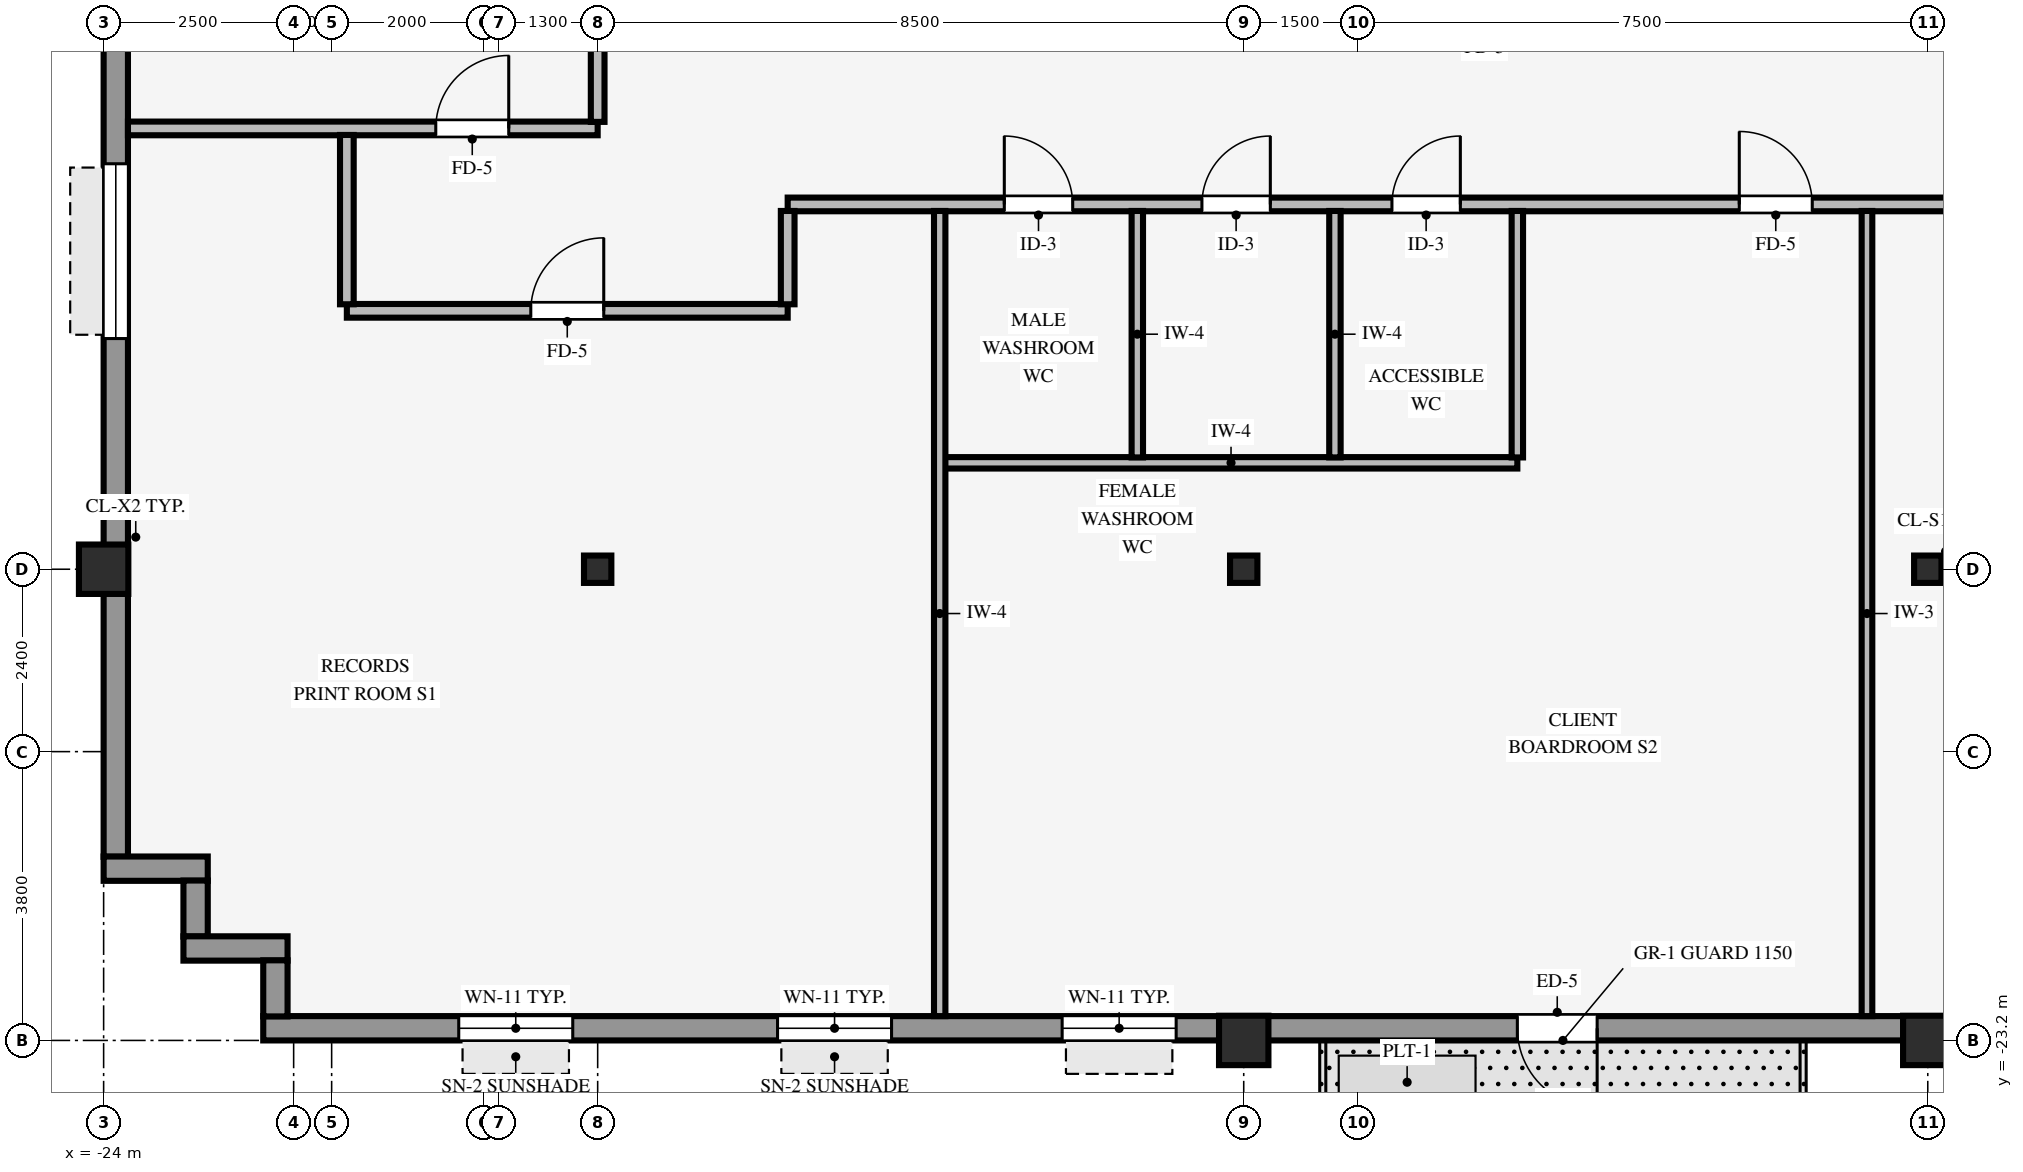
"""IFC4 building model, lengths in metres.
Left out: names, types, materials, properties, quantities, classifications, styles, units other than length and angle.
Written with IfcOpenShell. Run it as: python <this file> out.ifc"""

import sys

from ifc_helpers import new_model, si_unit, direction, frame, frame_2d, origin, origin_2d, place, context, subcontext, project, spatial, rectangle, hollow_rectangle, i_section, extrude, source, transform, mapped, element, fill, save


model = new_model("IFC4")
c1 = context("Model", 3, precision=1e-05, world=origin(), true_north=direction((0.0, 1.0)))
c2 = subcontext(c1, "Body", "Model", "MODEL_VIEW")
j1 = project(units=[si_unit("LENGTHUNIT", "METRE"), si_unit("PLANEANGLEUNIT", "RADIAN")], contexts=[c1])
p1 = place(None, origin())
s1 = spatial("IfcSite", under=j1, at=p1, CompositionType="ELEMENT")
p2 = place(p1, origin())
s2 = spatial("IfcBuilding", under=s1, at=p2, CompositionType="ELEMENT")
p3 = place(p2, frame((0.0, 0.0, 109.25)))
s3 = spatial("IfcBuildingStorey", under=s2, at=p3, CompositionType="ELEMENT", Elevation=109.25)
for number, where, z_axis, x_axis in (
    (1, (-24.0, -17.0, 0.0), (0.0, 0.0, 1.0), (1.0, 0.0, 0.0)),
    (2, (-9.0, -23.2, 0.0), (0.0, 0.0, 1.0), (1.0, 0.0, 0.0)),
    (3, (0.0, -23.2, 0.0), (0.0, 0.0, 1.0), (1.0, 0.0, 0.0)),
):
    element("IfcColumn", number, at=place(p3, frame(where, z_axis=z_axis, x_axis=x_axis)), inside=s3, PredefinedType="COLUMN", context=c2, shape_type="SweptSolid", body=[
        extrude(hollow_rectangle(XDim=0.65, YDim=0.65, WallThickness=0.04, InnerFilletRadius=0.04, OuterFilletRadius=0.08, at=origin_2d()), origin(), (0.0, 0.0, 1.0), 3.37),
    ])
for number, where, z_axis, x_axis in (
    (4, (0.0, -17.0, 0.0), (0.0, 0.0, 1.0), (1.0, 0.0, 0.0)),
    (5, (-17.5, -17.0, 0.0), (0.0, 0.0, 1.0), (1.0, 0.0, 0.0)),
    (6, (-9.0, -17.0, 0.0), (0.0, 0.0, 1.0), (1.0, 0.0, 0.0)),
):
    element("IfcColumn", number, at=place(p3, frame(where, z_axis=z_axis, x_axis=x_axis)), inside=s3, PredefinedType="COLUMN", context=c2, shape_type="SweptSolid", body=[
        extrude(i_section(OverallWidth=0.36, OverallDepth=0.36, WebThickness=0.021, FlangeThickness=0.021, FilletRadius=0.018, at=origin_2d()), origin(), (0.0, 0.0, 1.0), 3.37),
    ])
p4 = place(p3, frame((-21.9, -23.04, 0.0), z_axis=(0.0, 0.0, 1.0), x_axis=(1.0, 0.0, 0.0)))
e7 = element("IfcWall", 7, at=p4, inside=s3, PredefinedType="STANDARD", context=c2, shape_type="SweptSolid", body=[
    extrude(rectangle(XDim=43.8, YDim=0.32, at=frame_2d((21.9, 0.0))), origin(), (0.0, 0.0, 1.0), 2.705),
])
p5 = place(p4, frame((17.55, 0.0, 0.0), z_axis=(0.0, 0.0, 1.0), x_axis=(-1.0, 0.0, 0.0)))
e8 = element("IfcOpeningElement", 8, at=p5, cuts=e7, PredefinedType="OPENING", context=c2, shape_type="SweptSolid", body=[
    extrude(rectangle(XDim=1.05, YDim=2.1, at=frame_2d((0.525, 1.05))), frame((0.0, 0.17, 0.0), z_axis=(0.0, -1.0, 0.0), x_axis=(1.0, 0.0, 0.0)), (0.0, 0.0, 1.0), 0.34),
])
p6 = place(p4, frame((2.572, 0.0, 0.8)))
e9 = element("IfcOpeningElement", 9, at=p6, cuts=e7, PredefinedType="OPENING", context=c2, shape_type="SweptSolid", body=[
    extrude(rectangle(XDim=1.5, YDim=1.6, at=frame_2d((0.75, 0.8))), frame((0.0, 0.17, 0.0), z_axis=(0.0, -1.0, 0.0), x_axis=(1.0, 0.0, 0.0)), (0.0, 0.0, 1.0), 0.34),
])
p7 = place(p4, frame((6.767, 0.0, 0.8)))
e10 = element("IfcOpeningElement", 10, at=p7, cuts=e7, PredefinedType="OPENING", context=c2, shape_type="SweptSolid", body=[
    extrude(rectangle(XDim=1.5, YDim=1.6, at=frame_2d((0.75, 0.8))), frame((0.0, 0.17, 0.0), z_axis=(0.0, -1.0, 0.0), x_axis=(1.0, 0.0, 0.0)), (0.0, 0.0, 1.0), 0.34),
])
p8 = place(p4, frame((10.511, 0.0, 0.8)))
e11 = element("IfcOpeningElement", 11, at=p8, cuts=e7, PredefinedType="OPENING", context=c2, shape_type="SweptSolid", body=[
    extrude(rectangle(XDim=1.5, YDim=1.6, at=frame_2d((0.75, 0.8))), frame((0.0, 0.17, 0.0), z_axis=(0.0, -1.0, 0.0), x_axis=(1.0, 0.0, 0.0)), (0.0, 0.0, 1.0), 0.34),
])
p9 = place(p4, frame((25.794, 0.0, 0.8)))
e12 = element("IfcOpeningElement", 12, at=p9, cuts=e7, PredefinedType="OPENING", context=c2, shape_type="SweptSolid", body=[
    extrude(rectangle(XDim=1.5, YDim=1.6, at=frame_2d((0.75, 0.8))), frame((0.0, 0.17, 0.0), z_axis=(0.0, -1.0, 0.0), x_axis=(1.0, 0.0, 0.0)), (0.0, 0.0, 1.0), 0.34),
])
p10 = place(p4, frame((31.789, 0.0, 0.8)))
e13 = element("IfcOpeningElement", 13, at=p10, cuts=e7, PredefinedType="OPENING", context=c2, shape_type="SweptSolid", body=[
    extrude(rectangle(XDim=1.5, YDim=1.6, at=frame_2d((0.75, 0.8))), frame((0.0, 0.17, 0.0), z_axis=(0.0, -1.0, 0.0), x_axis=(1.0, 0.0, 0.0)), (0.0, 0.0, 1.0), 0.34),
])
p11 = place(p4, frame((35.083, 0.0, 0.8)))
e14 = element("IfcOpeningElement", 14, at=p11, cuts=e7, PredefinedType="OPENING", context=c2, shape_type="SweptSolid", body=[
    extrude(rectangle(XDim=1.5, YDim=1.6, at=frame_2d((0.75, 0.8))), frame((0.0, 0.17, 0.0), z_axis=(0.0, -1.0, 0.0), x_axis=(1.0, 0.0, 0.0)), (0.0, 0.0, 1.0), 0.34),
])
p12 = place(p4, frame((39.728, 0.0, 0.8)))
e15 = element("IfcOpeningElement", 15, at=p12, cuts=e7, PredefinedType="OPENING", context=c2, shape_type="SweptSolid", body=[
    extrude(rectangle(XDim=1.5, YDim=1.6, at=frame_2d((0.75, 0.8))), frame((0.0, 0.17, 0.0), z_axis=(0.0, -1.0, 0.0), x_axis=(1.0, 0.0, 0.0)), (0.0, 0.0, 1.0), 0.34),
])
p13 = place(p3, frame((-23.84, -20.784, 0.0), z_axis=(0.0, 0.0, 1.0), x_axis=(0.0, 1.0, 0.0)))
e16 = element("IfcWall", 16, at=p13, inside=s3, PredefinedType="STANDARD", context=c2, shape_type="SweptSolid", body=[
    extrude(rectangle(XDim=41.568, YDim=0.32, at=frame_2d((20.784, 0.0))), origin(), (0.0, 0.0, 1.0), 2.705),
])
p14 = place(p13, frame((6.819, 0.0, 0.8)))
e17 = element("IfcOpeningElement", 17, at=p14, cuts=e16, PredefinedType="OPENING", context=c2, shape_type="SweptSolid", body=[
    extrude(rectangle(XDim=2.3, YDim=1.62, at=frame_2d((1.15, 0.81))), frame((0.0, 0.17, 0.0), z_axis=(0.0, -1.0, 0.0), x_axis=(1.0, 0.0, 0.0)), (0.0, 0.0, 1.0), 0.34),
])
p15 = place(p13, frame((12.215, 0.0, 0.8)))
e18 = element("IfcOpeningElement", 18, at=p15, cuts=e16, PredefinedType="OPENING", context=c2, shape_type="SweptSolid", body=[
    extrude(rectangle(XDim=2.3, YDim=1.62, at=frame_2d((1.15, 0.81))), frame((0.0, 0.17, 0.0), z_axis=(0.0, -1.0, 0.0), x_axis=(1.0, 0.0, 0.0)), (0.0, 0.0, 1.0), 0.34),
])
p16 = place(p13, frame((17.161, 0.0, 0.8)))
e19 = element("IfcOpeningElement", 19, at=p16, cuts=e16, PredefinedType="OPENING", context=c2, shape_type="SweptSolid", body=[
    extrude(rectangle(XDim=2.3, YDim=1.62, at=frame_2d((1.15, 0.81))), frame((0.0, 0.17, 0.0), z_axis=(0.0, -1.0, 0.0), x_axis=(1.0, 0.0, 0.0)), (0.0, 0.0, 1.0), 0.34),
])
p17 = place(p13, frame((27.053, 0.0, 0.8)))
e20 = element("IfcOpeningElement", 20, at=p17, cuts=e16, PredefinedType="OPENING", context=c2, shape_type="SweptSolid", body=[
    extrude(rectangle(XDim=2.3, YDim=1.62, at=frame_2d((1.15, 0.81))), frame((0.0, 0.17, 0.0), z_axis=(0.0, -1.0, 0.0), x_axis=(1.0, 0.0, 0.0)), (0.0, 0.0, 1.0), 0.34),
])
p18 = place(p13, frame((32.449, 0.0, 0.8)))
e21 = element("IfcOpeningElement", 21, at=p18, cuts=e16, PredefinedType="OPENING", context=c2, shape_type="SweptSolid", body=[
    extrude(rectangle(XDim=2.3, YDim=1.62, at=frame_2d((1.15, 0.81))), frame((0.0, 0.17, 0.0), z_axis=(0.0, -1.0, 0.0), x_axis=(1.0, 0.0, 0.0)), (0.0, 0.0, 1.0), 0.34),
])
p19 = place(p3, frame((-24.0, -20.94, 0.0), z_axis=(0.0, 0.0, 1.0), x_axis=(1.0, 0.0, 0.0)))
e22 = element("IfcWall", 22, at=p19, inside=s3, PredefinedType="STANDARD", context=c2, shape_type="SweptSolid", body=[
    extrude(rectangle(XDim=1.37, YDim=0.32, at=frame_2d((0.685, 0.0))), origin(), (0.0, 0.0, 1.0), 3.36),
])
p20 = place(p3, frame((-22.79, -21.834, 0.0), z_axis=(0.0, 0.0, 1.0), x_axis=(0.0, 1.0, 0.0)))
e23 = element("IfcWall", 23, at=p20, inside=s3, PredefinedType="STANDARD", context=c2, shape_type="SweptSolid", body=[
    extrude(rectangle(XDim=0.738, YDim=0.32, at=frame_2d((0.369, 0.0))), origin(), (0.0, 0.0, 1.0), 3.36),
])
p21 = place(p3, frame((-22.95, -21.99, 0.0), z_axis=(0.0, 0.0, 1.0), x_axis=(1.0, 0.0, 0.0)))
e24 = element("IfcWall", 24, at=p21, inside=s3, PredefinedType="STANDARD", context=c2, shape_type="SweptSolid", body=[
    extrude(rectangle(XDim=1.37, YDim=0.32, at=frame_2d((0.685, 0.0))), origin(), (0.0, 0.0, 1.0), 3.36),
])
p22 = place(p3, frame((-21.74, -22.884, 0.0), z_axis=(0.0, 0.0, 1.0), x_axis=(0.0, 1.0, 0.0)))
e25 = element("IfcWall", 25, at=p22, inside=s3, PredefinedType="STANDARD", context=c2, shape_type="SweptSolid", body=[
    extrude(rectangle(XDim=0.738, YDim=0.32, at=frame_2d((0.369, 0.0))), origin(), (0.0, 0.0, 1.0), 3.36),
])
p23 = place(p3, frame((-12.934, -15.6, 0.0), z_axis=(0.0, 0.0, 1.0), x_axis=(1.0, 0.0, 0.0)))
e26 = element("IfcWall", 26, at=p23, inside=s3, PredefinedType="PARTITIONING", context=c2, shape_type="SweptSolid", body=[
    extrude(rectangle(XDim=7.534, YDim=0.15, at=frame_2d((3.767, 0.0))), origin(), (0.0, 0.0, 1.0), 3.36),
])
p24 = place(p3, frame((-20.8, -13.6, 0.0), z_axis=(0.0, 0.0, 1.0), x_axis=(1.0, 0.0, 0.0)))
e27 = element("IfcWall", 27, at=p24, inside=s3, PredefinedType="PARTITIONING", context=c2, shape_type="SweptSolid", body=[
    extrude(rectangle(XDim=5.8, YDim=0.18, at=frame_2d((2.9, 0.0))), origin(), (0.0, 0.0, 1.0), 2.998),
])
p25 = place(p24, frame((2.42, 0.0, 0.0)))
e28 = element("IfcOpeningElement", 28, at=p25, cuts=e27, PredefinedType="OPENING", context=c2, shape_type="SweptSolid", body=[
    extrude(rectangle(XDim=0.96, YDim=2.1, at=frame_2d((0.48, 1.05))), frame((0.0, 0.1, 0.0), z_axis=(0.0, -1.0, 0.0), x_axis=(1.0, 0.0, 0.0)), (0.0, 0.0, 1.0), 0.2),
])
p26 = place(p3, frame((-15.0, -12.2, 0.0), z_axis=(0.0, 0.0, 1.0), x_axis=(1.0, 0.0, 0.0)))
e29 = element("IfcWall", 29, at=p26, inside=s3, PredefinedType="PARTITIONING", context=c2, shape_type="SweptSolid", body=[
    extrude(rectangle(XDim=30.0, YDim=0.18, at=frame_2d((15.0, 0.0))), origin(), (0.0, 0.0, 1.0), 3.36),
])
p27 = place(p26, frame((17.935, 0.0, 0.0)))
e30 = element("IfcOpeningElement", 30, at=p27, cuts=e29, PredefinedType="OPENING", context=c2, shape_type="SweptSolid", body=[
    extrude(rectangle(XDim=0.96, YDim=2.1, at=frame_2d((0.48, 1.05))), frame((0.0, 0.1, 0.0), z_axis=(0.0, -1.0, 0.0), x_axis=(1.0, 0.0, 0.0)), (0.0, 0.0, 1.0), 0.2),
])
p28 = place(p26, frame((25.835, 0.0, 0.0)))
e31 = element("IfcOpeningElement", 31, at=p28, cuts=e29, PredefinedType="OPENING", context=c2, shape_type="SweptSolid", body=[
    extrude(rectangle(XDim=0.96, YDim=2.1, at=frame_2d((0.48, 1.05))), frame((0.0, 0.1, 0.0), z_axis=(0.0, -1.0, 0.0), x_axis=(1.0, 0.0, 0.0)), (0.0, 0.0, 1.0), 0.2),
])
p29 = place(p26, frame((5.45, 0.0, 0.0)))
e32 = element("IfcOpeningElement", 32, at=p29, cuts=e29, PredefinedType="OPENING", context=c2, shape_type="SweptSolid", body=[
    extrude(rectangle(XDim=0.9, YDim=2.1, at=frame_2d((0.45, 1.05))), frame((0.0, 0.1, 0.0), z_axis=(0.0, -1.0, 0.0), x_axis=(1.0, 0.0, 0.0)), (0.0, 0.0, 1.0), 0.2),
])
p30 = place(p26, frame((2.85, 0.0, 0.0)))
e33 = element("IfcOpeningElement", 33, at=p30, cuts=e29, PredefinedType="OPENING", context=c2, shape_type="SweptSolid", body=[
    extrude(rectangle(XDim=0.9, YDim=2.1, at=frame_2d((0.45, 1.05))), frame((0.0, 0.1, 0.0), z_axis=(0.0, -1.0, 0.0), x_axis=(1.0, 0.0, 0.0)), (0.0, 0.0, 1.0), 0.2),
])
p31 = place(p26, frame((12.52, 0.0, 0.0)))
e34 = element("IfcOpeningElement", 34, at=p31, cuts=e29, PredefinedType="OPENING", context=c2, shape_type="SweptSolid", body=[
    extrude(rectangle(XDim=0.96, YDim=2.1, at=frame_2d((0.48, 1.05))), frame((0.0, 0.1, 0.0), z_axis=(0.0, -1.0, 0.0), x_axis=(1.0, 0.0, 0.0)), (0.0, 0.0, 1.0), 0.2),
])
p32 = place(p26, frame((7.95, 0.0, 0.0)))
e35 = element("IfcOpeningElement", 35, at=p32, cuts=e29, PredefinedType="OPENING", context=c2, shape_type="SweptSolid", body=[
    extrude(rectangle(XDim=0.9, YDim=2.1, at=frame_2d((0.45, 1.05))), frame((0.0, 0.1, 0.0), z_axis=(0.0, -1.0, 0.0), x_axis=(1.0, 0.0, 0.0)), (0.0, 0.0, 1.0), 0.2),
])
p33 = place(p3, frame((-23.68, -11.2, 0.0), z_axis=(0.0, 0.0, 1.0), x_axis=(1.0, 0.0, 0.0)))
e36 = element("IfcWall", 36, at=p33, inside=s3, PredefinedType="PARTITIONING", context=c2, shape_type="SweptSolid", body=[
    extrude(rectangle(XDim=6.18, YDim=0.18, at=frame_2d((3.09, 0.0))), origin(), (0.0, 0.0, 1.0), 3.36),
])
p34 = place(p33, frame((4.05, 0.0, 0.0)))
e37 = element("IfcOpeningElement", 37, at=p34, cuts=e36, PredefinedType="OPENING", context=c2, shape_type="SweptSolid", body=[
    extrude(rectangle(XDim=0.96, YDim=2.1, at=frame_2d((0.48, 1.05))), frame((0.0, 0.1, 0.0), z_axis=(0.0, -1.0, 0.0), x_axis=(1.0, 0.0, 0.0)), (0.0, 0.0, 1.0), 0.2),
])
p35 = place(p3, frame((-20.8, -13.514, 0.0), z_axis=(0.0, 0.0, 1.0), x_axis=(0.0, 1.0, 0.0)))
e38 = element("IfcWall", 38, at=p35, inside=s3, PredefinedType="PARTITIONING", context=c2, shape_type="SweptSolid", body=[
    extrude(rectangle(XDim=2.228, YDim=0.18, at=frame_2d((1.114, 0.0))), origin(), (0.0, 0.0, 1.0), 3.36),
])
p36 = place(p3, frame((-17.5, -11.114, 0.0), z_axis=(0.0, 0.0, 1.0), x_axis=(0.0, 1.0, 0.0)))
e39 = element("IfcWall", 39, at=p36, inside=s3, PredefinedType="PARTITIONING", context=c2, shape_type="SweptSolid", body=[
    extrude(rectangle(XDim=0.968, YDim=0.18, at=frame_2d((0.484, 0.0))), origin(), (0.0, 0.0, 1.0), 2.738),
])
p37 = place(p3, frame((-15.0, -13.514, 0.0), z_axis=(0.0, 0.0, 1.0), x_axis=(0.0, 1.0, 0.0)))
e40 = element("IfcWall", 40, at=p37, inside=s3, PredefinedType="PARTITIONING", context=c2, shape_type="SweptSolid", body=[
    extrude(rectangle(XDim=1.228, YDim=0.18, at=frame_2d((0.614, 0.0))), origin(), (0.0, 0.0, 1.0), 3.36),
])
p38 = place(p3, frame((-13.0, -22.88, 0.0), z_axis=(0.0, 0.0, 1.0), x_axis=(0.0, 1.0, 0.0)))
e41 = element("IfcWall", 41, at=p38, inside=s3, PredefinedType="PARTITIONING", context=c2, shape_type="SweptSolid", body=[
    extrude(rectangle(XDim=10.594, YDim=0.15, at=frame_2d((5.297, 0.0))), origin(), (0.0, 0.0, 1.0), 3.36),
])
for number, where, z_axis, x_axis in (
    (42, (-10.4, -15.529, 0.0), (0.0, 0.0, 1.0), (0.0, 1.0, 0.0)),
    (43, (-7.8, -15.529, 0.0), (0.0, 0.0, 1.0), (0.0, 1.0, 0.0)),
    (44, (-5.4, -15.529, 0.0), (0.0, 0.0, 1.0), (0.0, 1.0, 0.0)),
):
    element("IfcWall", number, at=place(p3, frame(where, z_axis=z_axis, x_axis=x_axis)), inside=s3, PredefinedType="PARTITIONING", context=c2, shape_type="SweptSolid", body=[
        extrude(rectangle(XDim=3.243, YDim=0.15, at=frame_2d((1.622, 0.0))), origin(), (0.0, 0.0, 1.0), 3.36),
    ])
p39 = place(p3, frame((-0.8, -22.88, 0.0), z_axis=(0.0, 0.0, 1.0), x_axis=(0.0, 1.0, 0.0)))
e45 = element("IfcWall", 45, at=p39, inside=s3, PredefinedType="PARTITIONING", context=c2, shape_type="SweptSolid", body=[
    extrude(rectangle(XDim=10.594, YDim=0.14, at=frame_2d((5.297, 0.0))), origin(), (0.0, 0.0, 1.0), 3.36),
])
m1 = source(origin(), c2, "Body", "SweptSolid", [
    extrude(rectangle(XDim=1.05, YDim=2.1, at=frame_2d((0.525, 1.05))), frame((0.0, 0.025, 0.0), z_axis=(0.0, -1.0, 0.0), x_axis=(1.0, 0.0, 0.0)), (0.0, 0.0, 1.0), 0.05),
])
p40 = place(p5, origin())
e46 = element("IfcDoor", 46, at=p40, inside=s3, OperationType="SINGLE_SWING_LEFT", PredefinedType="DOOR", context=c2, shape_type="MappedRepresentation", body=[
    mapped(m1, transform((0.0, 0.0, 0.0), scale=1.0)),
])
fill(e8, e46)
m2 = source(origin(), c2, "Body", "SweptSolid", [
    extrude(rectangle(XDim=1.5, YDim=1.6, at=frame_2d((0.75, 0.8))), frame((0.0, 0.03, 0.0), z_axis=(0.0, -1.0, 0.0), x_axis=(1.0, 0.0, 0.0)), (0.0, 0.0, 1.0), 0.06),
])
p41 = place(p6, origin())
e47 = element("IfcWindow", 47, at=p41, inside=s3, PartitioningType="SINGLE_PANEL", PredefinedType="WINDOW", context=c2, shape_type="MappedRepresentation", body=[
    mapped(m2, transform((0.0, 0.0, 0.0), scale=1.0)),
])
fill(e9, e47)
p42 = place(p7, origin())
e48 = element("IfcWindow", 48, at=p42, inside=s3, PartitioningType="SINGLE_PANEL", PredefinedType="WINDOW", context=c2, shape_type="MappedRepresentation", body=[
    mapped(m2, transform((0.0, 0.0, 0.0), scale=1.0)),
])
fill(e10, e48)
p43 = place(p8, origin())
e49 = element("IfcWindow", 49, at=p43, inside=s3, PartitioningType="SINGLE_PANEL", PredefinedType="WINDOW", context=c2, shape_type="MappedRepresentation", body=[
    mapped(m2, transform((0.0, 0.0, 0.0), scale=1.0)),
])
fill(e11, e49)
m3 = source(origin(), c2, "Body", "SweptSolid", [
    extrude(rectangle(XDim=2.3, YDim=1.62, at=frame_2d((1.15, 0.81))), frame((0.0, 0.03, 0.0), z_axis=(0.0, -1.0, 0.0), x_axis=(1.0, 0.0, 0.0)), (0.0, 0.0, 1.0), 0.06),
])
p44 = place(p14, origin())
e50 = element("IfcWindow", 50, at=p44, inside=s3, PartitioningType="SINGLE_PANEL", PredefinedType="WINDOW", context=c2, shape_type="MappedRepresentation", body=[
    mapped(m3, transform((0.0, 0.0, 0.0), scale=1.0)),
])
fill(e17, e50)
m4 = source(origin(), c2, "Body", "SweptSolid", [
    extrude(rectangle(XDim=0.96, YDim=2.1, at=frame_2d((0.48, 1.05))), frame((0.0, 0.025, 0.0), z_axis=(0.0, -1.0, 0.0), x_axis=(1.0, 0.0, 0.0)), (0.0, 0.0, 1.0), 0.05),
])
p45 = place(p25, origin())
e51 = element("IfcDoor", 51, at=p45, inside=s3, OperationType="SINGLE_SWING_RIGHT", PredefinedType="DOOR", context=c2, shape_type="MappedRepresentation", body=[
    mapped(m4, transform((0.0, 0.0, 0.0), scale=1.0)),
])
fill(e28, e51)
p46 = place(p34, origin())
e52 = element("IfcDoor", 52, at=p46, inside=s3, OperationType="SINGLE_SWING_RIGHT", PredefinedType="DOOR", context=c2, shape_type="MappedRepresentation", body=[
    mapped(m4, transform((0.0, 0.0, 0.0), scale=1.0)),
])
fill(e37, e52)
m5 = source(origin(), c2, "Body", "SweptSolid", [
    extrude(rectangle(XDim=0.9, YDim=2.1, at=frame_2d((0.45, 1.05))), frame((0.0, 0.025, 0.0), z_axis=(0.0, -1.0, 0.0), x_axis=(1.0, 0.0, 0.0)), (0.0, 0.0, 1.0), 0.05),
])
p47 = place(p29, origin())
e53 = element("IfcDoor", 53, at=p47, inside=s3, OperationType="SINGLE_SWING_RIGHT", PredefinedType="DOOR", context=c2, shape_type="MappedRepresentation", body=[
    mapped(m5, transform((0.0, 0.0, 0.0), scale=1.0)),
])
fill(e32, e53)
p48 = place(p30, origin())
e54 = element("IfcDoor", 54, at=p48, inside=s3, OperationType="SINGLE_SWING_LEFT", PredefinedType="DOOR", context=c2, shape_type="MappedRepresentation", body=[
    mapped(m5, transform((0.0, 0.0, 0.0), scale=1.0)),
])
fill(e33, e54)
p49 = place(p31, origin())
e55 = element("IfcDoor", 55, at=p49, inside=s3, OperationType="SINGLE_SWING_LEFT", PredefinedType="DOOR", context=c2, shape_type="MappedRepresentation", body=[
    mapped(m4, transform((0.0, 0.0, 0.0), scale=1.0)),
])
fill(e34, e55)
p50 = place(p32, origin())
e56 = element("IfcDoor", 56, at=p50, inside=s3, OperationType="SINGLE_SWING_RIGHT", PredefinedType="DOOR", context=c2, shape_type="MappedRepresentation", body=[
    mapped(m5, transform((0.0, 0.0, 0.0), scale=1.0)),
])
fill(e35, e56)
save(model, sys.argv[1])
